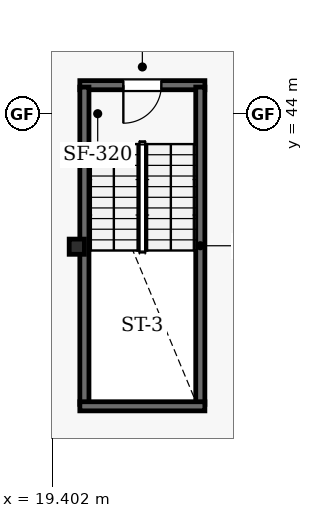
"""IFC4 building model, lengths in metres.
Left out: names, types, materials, properties, quantities, classifications, styles, units other than length and angle.
Written with IfcOpenShell. Run it as: python <this file> out.ifc"""

import sys

from ifc_helpers import new_model, si_unit, direction, frame, frame_2d, origin, origin_2d, place, context, subcontext, project, spatial, rectangle, i_section, extrude, element, fill, save


model = new_model("IFC4")
c1 = context("Model", 3, precision=1e-05, world=origin(), true_north=direction((0.0, 1.0)))
c2 = subcontext(c1, "Body", "Model", "MODEL_VIEW")
j1 = project(units=[si_unit("LENGTHUNIT", "METRE"), si_unit("PLANEANGLEUNIT", "RADIAN")], contexts=[c1])
p1 = place(None, origin())
s1 = spatial("IfcSite", under=j1, at=p1, CompositionType="ELEMENT")
p2 = place(p1, origin())
s2 = spatial("IfcBuilding", under=s1, at=p2, CompositionType="ELEMENT")
p3 = place(p2, frame((0.0, 0.0, -7.8)))
s3 = spatial("IfcBuildingStorey", under=s2, at=p3, CompositionType="ELEMENT", Elevation=-7.8)
p4 = place(p3, frame((20.05, 40.5, 0.0), z_axis=(0.0, 0.0, 1.0), x_axis=(1.0, 0.0, 0.0)))
e1 = element("IfcColumn", 1, at=p4, inside=s3, PredefinedType="PILASTER", context=c2, shape_type="SweptSolid", body=[
    extrude(i_section(OverallWidth=0.4, OverallDepth=0.4, WebThickness=0.013, FlangeThickness=0.021, FilletRadius=0.022, at=origin_2d()), origin(), (0.0, 0.0, 1.0), 3.9),
])
p5 = place(p3, frame((20.13, 44.75, 0.0), z_axis=(0.0, 0.0, 1.0), x_axis=(1.0, 0.0, 0.0)))
e2 = element("IfcWall", 2, at=p5, inside=s3, PredefinedType="SHEAR", context=c2, shape_type="SweptSolid", body=[
    extrude(rectangle(XDim=3.29, YDim=0.24, at=frame_2d((1.645, 0.0))), origin(), (0.0, 0.0, 1.0), 3.58),
])
p6 = place(p5, frame((1.145, 0.0, 0.0)))
e3 = element("IfcOpeningElement", 3, at=p6, cuts=e2, PredefinedType="OPENING", context=c2, shape_type="SweptSolid", body=[
    extrude(rectangle(XDim=1.0, YDim=2.15, at=frame_2d((0.5, 1.075))), frame((0.0, 0.13, 0.0), z_axis=(0.0, -1.0, 0.0), x_axis=(1.0, 0.0, 0.0)), (0.0, 0.0, 1.0), 0.26),
])
for number, where, z_axis, x_axis in (
    (4, (20.25, 36.35, 0.0), (0.0, 0.0, 1.0), (0.0, 1.0, 0.0)),
    (5, (23.3, 36.35, 0.0), (0.0, 0.0, 1.0), (0.0, 1.0, 0.0)),
):
    element("IfcWall", number, at=place(p3, frame(where, z_axis=z_axis, x_axis=x_axis)), inside=s3, PredefinedType="SHEAR", context=c2, shape_type="SweptSolid", body=[
        extrude(rectangle(XDim=8.35, YDim=0.24, at=frame_2d((4.175, 0.0))), origin(), (0.0, 0.0, 1.0), 3.58),
    ])
p7 = place(p3, frame((20.13, 36.3, 0.0), z_axis=(0.0, 0.0, 1.0), x_axis=(1.0, 0.0, 0.0)))
e6 = element("IfcWall", 6, at=p7, inside=s3, PredefinedType="SHEAR", context=c2, shape_type="SweptSolid", body=[
    extrude(rectangle(XDim=3.29, YDim=0.24, at=frame_2d((1.645, 0.0))), origin(), (0.0, 0.0, 1.0), 3.58),
])
p8 = place(p6, frame((1.0, 0.0, 0.0), z_axis=(0.0, 0.0, 1.0), x_axis=(-1.0, 0.0, 0.0)))
e7 = element("IfcDoor", 7, at=p8, inside=s3, OperationType="SINGLE_SWING_LEFT", PredefinedType="DOOR", context=c2, shape_type="SweptSolid", body=[
    extrude(rectangle(XDim=1.0, YDim=2.15, at=frame_2d((0.5, 1.075))), frame((0.0, 0.025, 0.0), z_axis=(0.0, -1.0, 0.0), x_axis=(1.0, 0.0, 0.0)), (0.0, 0.0, 1.0), 0.05),
])
fill(e3, e7)
save(model, sys.argv[1])
